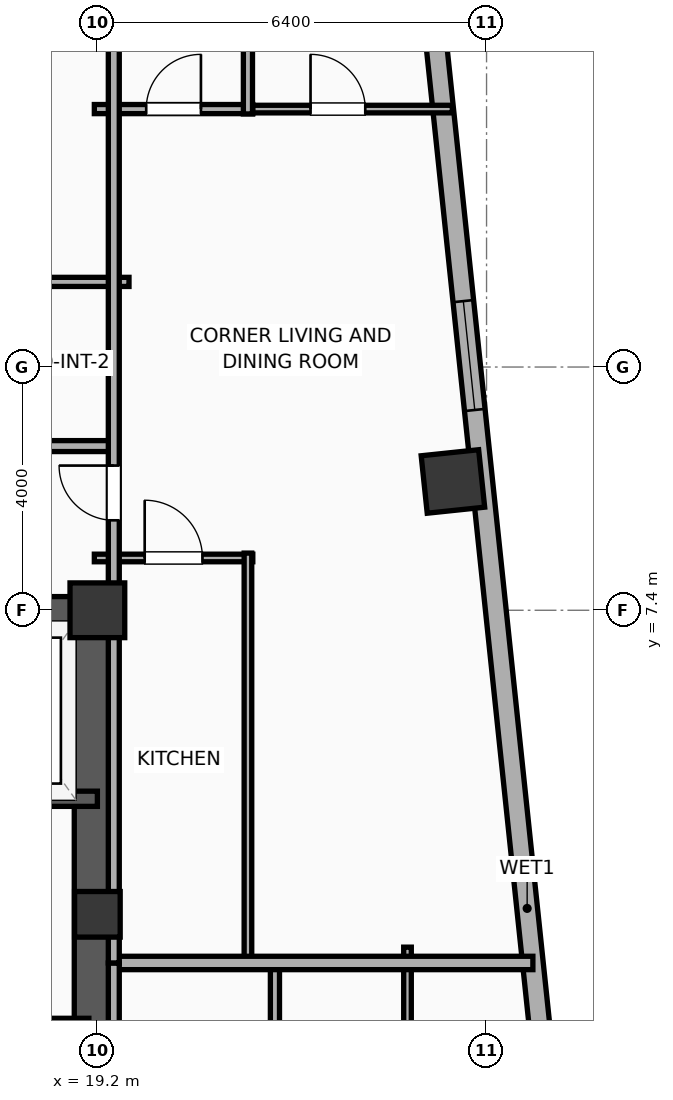
"""IFC4 building model, lengths in metres.
Left out: names, types, materials, properties, quantities, classifications, styles, units other than length and angle.
Written with IfcOpenShell. Run it as: python <this file> out.ifc"""

import sys

from ifc_helpers import new_model, si_unit, direction, frame, frame_2d, origin, origin_2d, place, context, subcontext, project, spatial, rectangle, hollow_rectangle, extrude, element, fill, save


model = new_model("IFC4")
c1 = context("Model", 3, precision=1e-05, world=origin(), true_north=direction((0.0, 1.0)))
c2 = subcontext(c1, "Body", "Model", "MODEL_VIEW")
j1 = project(units=[si_unit("LENGTHUNIT", "METRE"), si_unit("PLANEANGLEUNIT", "RADIAN")], contexts=[c1])
p1 = place(None, origin())
s1 = spatial("IfcSite", under=j1, at=p1, CompositionType="ELEMENT")
p2 = place(p1, origin())
s2 = spatial("IfcBuilding", under=s1, at=p2, CompositionType="ELEMENT")
p3 = place(p2, frame((0.0, 0.0, 191.1)))
s3 = spatial("IfcBuildingStorey", under=s2, at=p3, CompositionType="ELEMENT", Elevation=191.1)
p4 = place(p3, frame((19.2, 2.4, 0.0), z_axis=(0.0, 0.0, 1.0), x_axis=(1.0, 0.0, 0.0)))
e1 = element("IfcColumn", 1, at=p4, inside=s3, PredefinedType="COLUMN", context=c2, shape_type="SweptSolid", body=[
    extrude(rectangle(XDim=0.75, YDim=0.75, at=origin_2d()), origin(), (0.0, 0.0, 1.0), 3.9),
])
p5 = place(p3, frame((19.2, 7.4, 0.0), z_axis=(0.0, 0.0, 1.0), x_axis=(1.0, 0.0, 0.0)))
e2 = element("IfcColumn", 2, at=p5, inside=s3, PredefinedType="COLUMN", context=c2, shape_type="SweptSolid", body=[
    extrude(rectangle(XDim=0.9, YDim=0.9, at=origin_2d()), origin(), (0.0, 0.0, 1.0), 3.9),
])
p6 = place(p3, frame((12.175, 7.4, 0.0), z_axis=(0.0, 0.0, 1.0), x_axis=(1.0, 0.0, 0.0)))
e3 = element("IfcWall", 3, at=p6, inside=s3, PredefinedType="SHEAR", context=c2, shape_type="SweptSolid", body=[
    extrude(rectangle(XDim=7.25, YDim=0.45, at=frame_2d((3.625, 0.0))), origin(), (0.0, 0.0, 1.0), 3.5),
])
p7 = place(p3, frame((19.145, -7.4, 0.0), z_axis=(0.0, 0.0, 1.0), x_axis=(0.0, 1.0, 0.0)))
e4 = element("IfcWall", 4, at=p7, inside=s3, PredefinedType="SHEAR", context=c2, shape_type="SweptSolid", body=[
    extrude(rectangle(XDim=14.8, YDim=0.65, at=frame_2d((7.4, 0.0))), origin(), (0.0, 0.0, 1.0), 3.5),
])
p8 = place(p3, frame((25.047, 9.518, 0.0), z_axis=(0.0, 0.0, 1.0), x_axis=(0.994521895368, 0.104528463268, 0.0)))
e5 = element("IfcColumn", 5, at=p8, inside=s3, PredefinedType="COLUMN", context=c2, shape_type="SweptSolid", body=[
    extrude(hollow_rectangle(XDim=0.95, YDim=0.95, WallThickness=0.032, at=origin_2d()), origin(), (0.0, 0.0, 1.0), 3.865),
])
p9 = place(p3, frame((24.534, 18.99, 0.0), z_axis=(0.0, 0.0, 1.0), x_axis=(0.104534959766, -0.994521212537, 0.0)))
e6 = element("IfcWall", 6, at=p9, inside=s3, PredefinedType="ELEMENTEDWALL", context=c2, shape_type="SweptSolid", body=[
    extrude(rectangle(XDim=33.166, YDim=0.34, at=frame_2d((16.583, 0.0))), origin(), (0.0, 0.0, 1.0), 2.39),
])
p10 = place(p9, frame((6.542, 0.0, 0.75)))
e7 = element("IfcOpeningElement", 7, at=p10, cuts=e6, PredefinedType="OPENING", context=c2, shape_type="SweptSolid", body=[
    extrude(rectangle(XDim=1.8, YDim=1.45, at=frame_2d((0.9, 0.725))), frame((0.0, 0.18, 0.0), z_axis=(0.0, -1.0, 0.0), x_axis=(1.0, 0.0, 0.0)), (0.0, 0.0, 1.0), 0.36),
])
p11 = place(p9, frame((25.625, 0.0, 0.75)))
e8 = element("IfcOpeningElement", 8, at=p11, cuts=e6, PredefinedType="OPENING", context=c2, shape_type="SweptSolid", body=[
    extrude(rectangle(XDim=1.8, YDim=1.45, at=frame_2d((0.9, 0.725))), frame((0.0, 0.18, 0.0), z_axis=(0.0, -1.0, 0.0), x_axis=(1.0, 0.0, 0.0)), (0.0, 0.0, 1.0), 0.36),
])
p12 = place(p9, frame((18.557, 0.0, 0.55)))
e9 = element("IfcOpeningElement", 9, at=p12, cuts=e6, PredefinedType="OPENING", context=c2, shape_type="SweptSolid", body=[
    extrude(rectangle(XDim=1.2, YDim=1.15, at=frame_2d((0.6, 0.575))), frame((0.0, 0.18, 0.0), z_axis=(0.0, -1.0, 0.0), x_axis=(1.0, 0.0, 0.0)), (0.0, 0.0, 1.0), 0.36),
])
p13 = place(p3, frame((16.6, 4.3, 0.0), z_axis=(0.0, 0.0, 1.0), x_axis=(1.0, 0.0, 0.0)))
e10 = element("IfcWall", 10, at=p13, inside=s3, PredefinedType="SOLIDWALL", context=c2, shape_type="SweptSolid", body=[
    extrude(rectangle(XDim=2.6, YDim=0.25, at=frame_2d((1.3, 0.0))), origin(), (0.0, 0.0, 1.0), 3.5),
])
p14 = place(p3, frame((15.7, 0.6, 0.0), z_axis=(0.0, 0.0, 1.0), x_axis=(1.0, 0.0, 0.0)))
e11 = element("IfcWall", 11, at=p14, inside=s3, PredefinedType="PARTITIONING", context=c2, shape_type="SweptSolid", body=[
    extrude(rectangle(XDim=3.36, YDim=0.18, at=frame_2d((1.68, 0.0))), origin(), (0.0, 0.0, 1.0), 3.5),
])
p15 = place(p14, frame((1.155, 0.0, 0.0)))
e12 = element("IfcOpeningElement", 12, at=p15, cuts=e11, PredefinedType="OPENING", context=c2, shape_type="SweptSolid", body=[
    extrude(rectangle(XDim=1.05, YDim=2.05, at=frame_2d((0.525, 1.025))), frame((0.0, 0.1, 0.0), z_axis=(0.0, -1.0, 0.0), x_axis=(1.0, 0.0, 0.0)), (0.0, 0.0, 1.0), 0.2),
])
p16 = place(p3, frame((17.136, 12.8, 0.0), z_axis=(0.0, 0.0, 1.0), x_axis=(1.0, 0.0, 0.0)))
e13 = element("IfcWall", 13, at=p16, inside=s3, PredefinedType="PLUMBINGWALL", context=c2, shape_type="SweptSolid", body=[
    extrude(rectangle(XDim=2.584, YDim=0.15, at=frame_2d((1.292, 0.0))), origin(), (0.0, 0.0, 1.0), 3.5),
])
p17 = place(p3, frame((8.08, 10.1, 0.0), z_axis=(0.0, 0.0, 1.0), x_axis=(1.0, 0.0, 0.0)))
e14 = element("IfcWall", 14, at=p17, inside=s3, PredefinedType="PARTITIONING", context=c2, shape_type="SweptSolid", body=[
    extrude(rectangle(XDim=11.42, YDim=0.18, at=frame_2d((5.71, 0.0))), origin(), (0.0, 0.0, 1.0), 3.5),
])
p18 = place(p17, frame((2.562, 0.0, 0.0)))
e15 = element("IfcOpeningElement", 15, at=p18, cuts=e14, PredefinedType="OPENING", context=c2, shape_type="SweptSolid", body=[
    extrude(rectangle(XDim=0.9, YDim=2.05, at=frame_2d((0.45, 1.025))), frame((0.0, 0.1, 0.0), z_axis=(0.0, -1.0, 0.0), x_axis=(1.0, 0.0, 0.0)), (0.0, 0.0, 1.0), 0.2),
])
p19 = place(p17, frame((6.853, 0.0, 0.0)))
e16 = element("IfcOpeningElement", 16, at=p19, cuts=e14, PredefinedType="OPENING", context=c2, shape_type="SweptSolid", body=[
    extrude(rectangle(XDim=1.15, YDim=2.05, at=frame_2d((0.575, 1.025))), frame((0.0, 0.1, 0.0), z_axis=(0.0, -1.0, 0.0), x_axis=(1.0, 0.0, 0.0)), (0.0, 0.0, 1.0), 0.2),
])
p20 = place(p3, frame((24.3, -1.78, 0.0), z_axis=(0.0, 0.0, 1.0), x_axis=(0.0, 1.0, 0.0)))
e17 = element("IfcWall", 17, at=p20, inside=s3, PredefinedType="PARTITIONING", context=c2, shape_type="SweptSolid", body=[
    extrude(rectangle(XDim=3.64, YDim=0.125, at=frame_2d((1.82, 0.0))), origin(), (0.0, 0.0, 1.0), 3.5),
])
p21 = place(p20, frame((1.37, 0.0, 0.0)))
e18 = element("IfcOpeningElement", 18, at=p21, cuts=e17, PredefinedType="OPENING", context=c2, shape_type="SweptSolid", body=[
    extrude(rectangle(XDim=0.9, YDim=2.05, at=frame_2d((0.45, 1.025))), frame((0.0, 0.073, 0.0), z_axis=(0.0, -1.0, 0.0), x_axis=(1.0, 0.0, 0.0)), (0.0, 0.0, 1.0), 0.145),
])
p22 = place(p3, frame((22.12, -5.14, 0.0), z_axis=(0.0, 0.0, 1.0), x_axis=(0.0, 1.0, 0.0)))
e19 = element("IfcWall", 19, at=p22, inside=s3, PredefinedType="PLUMBINGWALL", context=c2, shape_type="SweptSolid", body=[
    extrude(rectangle(XDim=6.72, YDim=0.15, at=frame_2d((3.36, 0.0))), origin(), (0.0, 0.0, 1.0), 3.5),
])
p23 = place(p3, frame((21.616, 15.642, 0.0), z_axis=(0.0, 0.0, 1.0), x_axis=(1.0, 0.0, 0.0)))
e20 = element("IfcWall", 20, at=p23, inside=s3, PredefinedType="PARTITIONING", context=c2, shape_type="SweptSolid", body=[
    extrude(rectangle(XDim=3.421, YDim=0.125, at=frame_2d((1.71, 0.0))), origin(), (0.0, 0.0, 1.0), 3.5),
])
p24 = place(p23, frame((1.089, 0.0, 0.0)))
e21 = element("IfcOpeningElement", 21, at=p24, cuts=e20, PredefinedType="OPENING", context=c2, shape_type="SweptSolid", body=[
    extrude(rectangle(XDim=0.9, YDim=2.05, at=frame_2d((0.45, 1.025))), frame((0.0, 0.073, 0.0), z_axis=(0.0, -1.0, 0.0), x_axis=(1.0, 0.0, 0.0)), (0.0, 0.0, 1.0), 0.145),
])
p25 = place(p3, frame((19.15, 8.26, 0.0), z_axis=(0.0, 0.0, 1.0), x_axis=(1.0, 0.0, 0.0)))
e22 = element("IfcWall", 22, at=p25, inside=s3, PredefinedType="PARTITIONING", context=c2, shape_type="SweptSolid", body=[
    extrude(rectangle(XDim=2.606, YDim=0.125, at=frame_2d((1.303, 0.0))), origin(), (0.0, 0.0, 1.0), 2.39),
])
p26 = place(p25, frame((0.828, 0.0, 0.0)))
e23 = element("IfcOpeningElement", 23, at=p26, cuts=e22, PredefinedType="OPENING", context=c2, shape_type="SweptSolid", body=[
    extrude(rectangle(XDim=0.95, YDim=2.05, at=frame_2d((0.475, 1.025))), frame((0.0, 0.073, 0.0), z_axis=(0.0, -1.0, 0.0), x_axis=(1.0, 0.0, 0.0)), (0.0, 0.0, 1.0), 0.145),
])
p27 = place(p3, frame((19.15, 15.642, 0.0), z_axis=(0.0, 0.0, 1.0), x_axis=(1.0, 0.0, 0.0)))
e24 = element("IfcWall", 24, at=p27, inside=s3, PredefinedType="PLUMBINGWALL", context=c2, shape_type="SweptSolid", body=[
    extrude(rectangle(XDim=2.606, YDim=0.15, at=frame_2d((1.303, 0.0))), origin(), (0.0, 0.0, 1.0), 3.5),
])
p28 = place(p27, frame((0.853, 0.0, 0.0)))
e25 = element("IfcOpeningElement", 25, at=p28, cuts=e24, PredefinedType="OPENING", context=c2, shape_type="SweptSolid", body=[
    extrude(rectangle(XDim=0.9, YDim=2.05, at=frame_2d((0.45, 1.025))), frame((0.0, 0.085, 0.0), z_axis=(0.0, -1.0, 0.0), x_axis=(1.0, 0.0, 0.0)), (0.0, 0.0, 1.0), 0.17),
])
p29 = place(p3, frame((21.676, 1.62, 0.0), z_axis=(0.0, 0.0, 1.0), x_axis=(0.0, 1.0, 0.0)))
e26 = element("IfcWall", 26, at=p29, inside=s3, PredefinedType="PARTITIONING", context=c2, shape_type="SweptSolid", body=[
    extrude(rectangle(XDim=6.72, YDim=0.125, at=frame_2d((3.36, 0.0))), origin(), (0.0, 0.0, 1.0), 3.5),
])
p30 = place(p3, frame((21.676, 15.562, 0.0), z_axis=(0.0, 0.0, 1.0), x_axis=(0.0, 1.0, 0.0)))
e27 = element("IfcWall", 27, at=p30, inside=s3, PredefinedType="PLUMBINGWALL", context=c2, shape_type="SweptSolid", body=[
    extrude(rectangle(XDim=6.718, YDim=0.15, at=frame_2d((3.359, 0.0))), origin(), (0.0, 0.0, 1.0), 3.5),
])
p31 = place(p3, frame((19.47, 1.6, 0.0), z_axis=(0.0, 0.0, 1.0), x_axis=(1.0, 0.0, 0.0)))
e28 = element("IfcWall", 28, at=p31, inside=s3, PredefinedType="PARTITIONING", context=c2, shape_type="SweptSolid", body=[
    extrude(rectangle(XDim=6.892, YDim=0.22, at=frame_2d((3.446, 0.0))), origin(), (0.0, 0.0, 1.0), 3.5),
])
p32 = place(p3, frame((19.47, -18.559, 0.0), z_axis=(0.0, 0.0, 1.0), x_axis=(0.0, 1.0, 0.0)))
e29 = element("IfcWall", 29, at=p32, inside=s3, PredefinedType="PARTITIONING", context=c2, shape_type="SweptSolid", body=[
    extrude(rectangle(XDim=20.159, YDim=0.18, at=frame_2d((10.079, 0.0))), origin(), (0.0, 0.0, 1.0), 3.5),
])
p33 = place(p32, frame((8.779, 0.0, 0.0)))
e30 = element("IfcOpeningElement", 30, at=p33, cuts=e29, PredefinedType="OPENING", context=c2, shape_type="SweptSolid", body=[
    extrude(rectangle(XDim=0.9, YDim=2.05, at=frame_2d((0.45, 1.025))), frame((0.0, 0.1, 0.0), z_axis=(0.0, -1.0, 0.0), x_axis=(1.0, 0.0, 0.0)), (0.0, 0.0, 1.0), 0.2),
])
p34 = place(p3, frame((19.47, 1.6, 0.0), z_axis=(0.0, 0.0, 1.0), x_axis=(0.0, 1.0, 0.0)))
e31 = element("IfcWall", 31, at=p34, inside=s3, PredefinedType="PARTITIONING", context=c2, shape_type="SweptSolid", body=[
    extrude(rectangle(XDim=20.524, YDim=0.18, at=frame_2d((10.262, 0.0))), origin(), (0.0, 0.0, 1.0), 3.5),
])
p35 = place(p34, frame((7.279, 0.0, 0.0)))
e32 = element("IfcOpeningElement", 32, at=p35, cuts=e31, PredefinedType="OPENING", context=c2, shape_type="SweptSolid", body=[
    extrude(rectangle(XDim=0.9, YDim=2.05, at=frame_2d((0.45, 1.025))), frame((0.0, 0.1, 0.0), z_axis=(0.0, -1.0, 0.0), x_axis=(1.0, 0.0, 0.0)), (0.0, 0.0, 1.0), 0.2),
])
p36 = place(p10, origin())
e33 = element("IfcWindow", 33, at=p36, inside=s3, PartitioningType="SINGLE_PANEL", PredefinedType="WINDOW", context=c2, shape_type="SweptSolid", body=[
    extrude(rectangle(XDim=1.8, YDim=1.45, at=frame_2d((0.9, 0.725))), frame((0.0, 0.03, 0.0), z_axis=(0.0, -1.0, 0.0), x_axis=(1.0, 0.0, 0.0)), (0.0, 0.0, 1.0), 0.06),
])
fill(e7, e33)
p37 = place(p24, origin())
e34 = element("IfcDoor", 34, at=p37, inside=s3, OperationType="SINGLE_SWING_LEFT", PredefinedType="DOOR", context=c2, shape_type="SweptSolid", body=[
    extrude(rectangle(XDim=0.9, YDim=2.05, at=frame_2d((0.45, 1.025))), frame((0.0, 0.025, 0.0), z_axis=(0.0, -1.0, 0.0), x_axis=(1.0, 0.0, 0.0)), (0.0, 0.0, 1.0), 0.05),
])
fill(e21, e34)
p38 = place(p26, origin())
e35 = element("IfcDoor", 35, at=p38, inside=s3, OperationType="SINGLE_SWING_LEFT", PredefinedType="DOOR", context=c2, shape_type="SweptSolid", body=[
    extrude(rectangle(XDim=0.95, YDim=2.05, at=frame_2d((0.475, 1.025))), frame((0.0, 0.025, 0.0), z_axis=(0.0, -1.0, 0.0), x_axis=(1.0, 0.0, 0.0)), (0.0, 0.0, 1.0), 0.05),
])
fill(e23, e35)
p39 = place(p28, origin())
e36 = element("IfcDoor", 36, at=p39, inside=s3, OperationType="SINGLE_SWING_RIGHT", PredefinedType="DOOR", context=c2, shape_type="SweptSolid", body=[
    extrude(rectangle(XDim=0.9, YDim=2.05, at=frame_2d((0.45, 1.025))), frame((0.0, 0.025, 0.0), z_axis=(0.0, -1.0, 0.0), x_axis=(1.0, 0.0, 0.0)), (0.0, 0.0, 1.0), 0.05),
])
fill(e25, e36)
p40 = place(p35, origin())
e37 = element("IfcDoor", 37, at=p40, inside=s3, OperationType="SINGLE_SWING_RIGHT", PredefinedType="DOOR", context=c2, shape_type="SweptSolid", body=[
    extrude(rectangle(XDim=0.9, YDim=2.05, at=frame_2d((0.45, 1.025))), frame((0.0, 0.025, 0.0), z_axis=(0.0, -1.0, 0.0), x_axis=(1.0, 0.0, 0.0)), (0.0, 0.0, 1.0), 0.05),
])
fill(e32, e37)
save(model, sys.argv[1])
